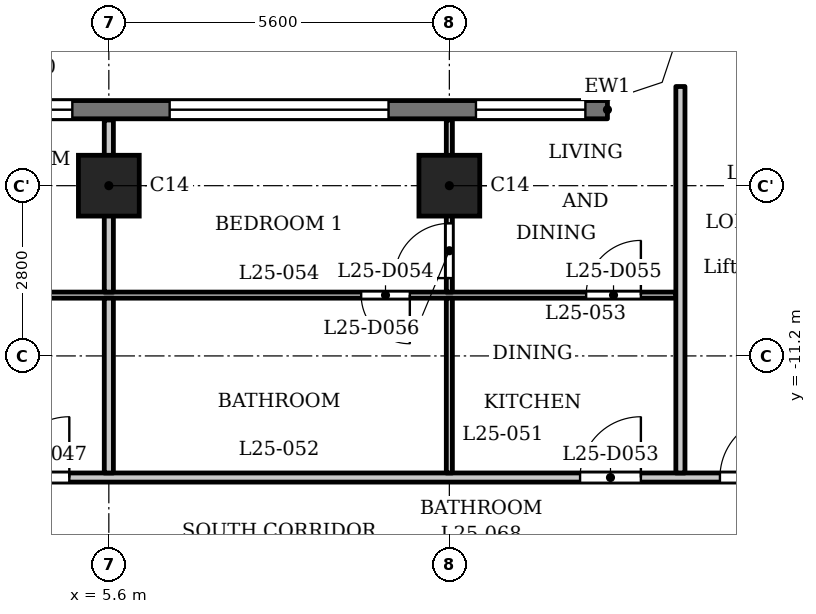
"""IFC4 building model, lengths in metres.
Left out: names, types, materials, properties, quantities, classifications, styles, units other than length and angle.
Written with IfcOpenShell. Run it as: python <this file> out.ifc"""

import sys

from ifc_helpers import new_model, si_unit, direction, frame, frame_2d, origin, origin_2d, place, context, subcontext, project, spatial, polyline, rectangle, outline, extrude, element, fill, save


model = new_model("IFC4")
c1 = context("Model", 3, precision=1e-05, world=origin(), true_north=direction((0.0, 1.0)))
c2 = subcontext(c1, "Body", "Model", "MODEL_VIEW")
j1 = project(units=[si_unit("LENGTHUNIT", "METRE"), si_unit("PLANEANGLEUNIT", "RADIAN")], contexts=[c1])
p1 = place(None, origin())
s1 = spatial("IfcSite", under=j1, at=p1, CompositionType="ELEMENT")
p2 = place(p1, origin())
s2 = spatial("IfcBuilding", under=s1, at=p2, CompositionType="ELEMENT")
p3 = place(p2, frame((0.0, 0.0, 100.8)))
s3 = spatial("IfcBuildingStorey", under=s2, at=p3, CompositionType="ELEMENT", Elevation=100.8)
for number, where, z_axis, x_axis in (
    (1, (5.6, -8.4, 0.0), (0.0, 0.0, 1.0), (1.0, 0.0, 0.0)),
    (2, (11.2, -8.4, 0.0), (0.0, 0.0, 1.0), (1.0, 0.0, 0.0)),
):
    element("IfcColumn", number, at=place(p3, frame(where, z_axis=z_axis, x_axis=x_axis)), inside=s3, PredefinedType="COLUMN", context=c2, shape_type="SweptSolid", body=[
        extrude(rectangle(XDim=1.0, YDim=1.0, at=origin_2d()), origin(), (0.0, 0.0, 1.0), 3.5),
    ])
p4 = place(p3, frame((13.8, -7.15, 0.0), z_axis=(0.0, 0.0, 1.0), x_axis=(-1.0, 0.0, 0.0)))
e3 = element("IfcWall", 3, at=p4, inside=s3, PredefinedType="SOLIDWALL", context=c2, shape_type="SweptSolid", body=[
    extrude(rectangle(XDim=27.6, YDim=0.3, at=frame_2d((13.8, 0.0))), origin(), (0.0, 0.0, 1.0), 3.2),
])
p5 = place(p4, frame((0.363, 0.0, 0.9)))
e4 = element("IfcOpeningElement", 4, at=p5, cuts=e3, PredefinedType="OPENING", context=c2, shape_type="SweptSolid", body=[
    extrude(rectangle(XDim=1.8, YDim=1.25, at=frame_2d((0.9, 0.625))), frame((0.0, 0.16, 0.0), z_axis=(0.0, -1.0, 0.0), x_axis=(1.0, 0.0, 0.0)), (0.0, 0.0, 1.0), 0.32),
])
p6 = place(p4, frame((3.6, 0.0, 1.2)))
e5 = element("IfcOpeningElement", 5, at=p6, cuts=e3, PredefinedType="OPENING", context=c2, shape_type="SweptSolid", body=[
    extrude(rectangle(XDim=3.6, YDim=0.95, at=frame_2d((1.8, 0.475))), frame((0.0, 0.16, 0.0), z_axis=(0.0, -1.0, 0.0), x_axis=(1.0, 0.0, 0.0)), (0.0, 0.0, 1.0), 0.32),
])
p7 = place(p4, frame((8.8, 0.0, 0.9)))
e6 = element("IfcOpeningElement", 6, at=p7, cuts=e3, PredefinedType="OPENING", context=c2, shape_type="SweptSolid", body=[
    extrude(rectangle(XDim=1.8, YDim=1.25, at=frame_2d((0.9, 0.625))), frame((0.0, 0.16, 0.0), z_axis=(0.0, -1.0, 0.0), x_axis=(1.0, 0.0, 0.0)), (0.0, 0.0, 1.0), 0.32),
])
p8 = place(p4, frame((11.6, 0.0, 0.9)))
e7 = element("IfcOpeningElement", 7, at=p8, cuts=e3, PredefinedType="OPENING", context=c2, shape_type="SweptSolid", body=[
    extrude(rectangle(XDim=1.8, YDim=1.25, at=frame_2d((0.9, 0.625))), frame((0.0, 0.16, 0.0), z_axis=(0.0, -1.0, 0.0), x_axis=(1.0, 0.0, 0.0)), (0.0, 0.0, 1.0), 0.32),
])
p9 = place(p4, frame((14.8, 0.0, 1.2)))
e8 = element("IfcOpeningElement", 8, at=p9, cuts=e3, PredefinedType="OPENING", context=c2, shape_type="SweptSolid", body=[
    extrude(rectangle(XDim=3.6, YDim=0.95, at=frame_2d((1.8, 0.475))), frame((0.0, 0.16, 0.0), z_axis=(0.0, -1.0, 0.0), x_axis=(1.0, 0.0, 0.0)), (0.0, 0.0, 1.0), 0.32),
])
p10 = place(p4, frame((20.4, 0.0, 1.2)))
e9 = element("IfcOpeningElement", 9, at=p10, cuts=e3, PredefinedType="OPENING", context=c2, shape_type="SweptSolid", body=[
    extrude(rectangle(XDim=3.6, YDim=0.95, at=frame_2d((1.8, 0.475))), frame((0.0, 0.16, 0.0), z_axis=(0.0, -1.0, 0.0), x_axis=(1.0, 0.0, 0.0)), (0.0, 0.0, 1.0), 0.32),
])
p11 = place(p4, frame((25.438, 0.0, 0.9)))
e10 = element("IfcOpeningElement", 10, at=p11, cuts=e3, PredefinedType="OPENING", context=c2, shape_type="SweptSolid", body=[
    extrude(rectangle(XDim=1.8, YDim=1.25, at=frame_2d((0.9, 0.625))), frame((0.0, 0.16, 0.0), z_axis=(0.0, -1.0, 0.0), x_axis=(1.0, 0.0, 0.0)), (0.0, 0.0, 1.0), 0.32),
])
p12 = place(p3, frame((-17.4, -13.2, 0.0), z_axis=(0.0, 0.0, 1.0), x_axis=(1.0, 0.0, 0.0)))
e11 = element("IfcWall", 11, at=p12, inside=s3, PredefinedType="PARTITIONING", context=c2, shape_type="SweptSolid", body=[
    extrude(rectangle(XDim=34.8, YDim=0.15, at=frame_2d((17.4, 0.0))), origin(), (0.0, 0.0, 1.0), 3.2),
])
p13 = place(p12, frame((0.65, 0.0, 0.0)))
e12 = element("IfcOpeningElement", 12, at=p13, cuts=e11, PredefinedType="OPENING", context=c2, shape_type="SweptSolid", body=[
    extrude(rectangle(XDim=1.0, YDim=2.1, at=frame_2d((0.5, 1.05))), frame((0.0, 0.085, 0.0), z_axis=(0.0, -1.0, 0.0), x_axis=(1.0, 0.0, 0.0)), (0.0, 0.0, 1.0), 0.17),
])
p14 = place(p12, frame((33.05, 0.0, 0.0)))
e13 = element("IfcOpeningElement", 13, at=p14, cuts=e11, PredefinedType="OPENING", context=c2, shape_type="SweptSolid", body=[
    extrude(rectangle(XDim=1.0, YDim=2.1, at=frame_2d((0.5, 1.05))), frame((0.0, 0.085, 0.0), z_axis=(0.0, -1.0, 0.0), x_axis=(1.0, 0.0, 0.0)), (0.0, 0.0, 1.0), 0.17),
])
p15 = place(p12, frame((4.55, 0.0, 0.0)))
e14 = element("IfcOpeningElement", 14, at=p15, cuts=e11, PredefinedType="OPENING", context=c2, shape_type="SweptSolid", body=[
    extrude(rectangle(XDim=1.0, YDim=2.1, at=frame_2d((0.5, 1.05))), frame((0.0, 0.085, 0.0), z_axis=(0.0, -1.0, 0.0), x_axis=(1.0, 0.0, 0.0)), (0.0, 0.0, 1.0), 0.17),
])
p16 = place(p12, frame((21.35, 0.0, 0.0)))
e15 = element("IfcOpeningElement", 15, at=p16, cuts=e11, PredefinedType="OPENING", context=c2, shape_type="SweptSolid", body=[
    extrude(rectangle(XDim=1.0, YDim=2.1, at=frame_2d((0.5, 1.05))), frame((0.0, 0.085, 0.0), z_axis=(0.0, -1.0, 0.0), x_axis=(1.0, 0.0, 0.0)), (0.0, 0.0, 1.0), 0.17),
])
p17 = place(p12, frame((30.75, 0.0, 0.0)))
e16 = element("IfcOpeningElement", 16, at=p17, cuts=e11, PredefinedType="OPENING", context=c2, shape_type="SweptSolid", body=[
    extrude(rectangle(XDim=1.0, YDim=2.1, at=frame_2d((0.5, 1.05))), frame((0.0, 0.085, 0.0), z_axis=(0.0, -1.0, 0.0), x_axis=(1.0, 0.0, 0.0)), (0.0, 0.0, 1.0), 0.17),
])
p18 = place(p3, frame((-14.925, -10.2, 0.0), z_axis=(0.0, 0.0, 1.0), x_axis=(1.0, 0.0, 0.0)))
e17 = element("IfcWall", 17, at=p18, inside=s3, PredefinedType="PARTITIONING", context=c2, shape_type="SweptSolid", body=[
    extrude(rectangle(XDim=29.85, YDim=0.1, at=frame_2d((14.925, 0.0))), origin(), (0.0, 0.0, 1.0), 3.2),
])
p19 = place(p18, frame((7.875, 0.0, 0.0)))
e18 = element("IfcOpeningElement", 18, at=p19, cuts=e17, PredefinedType="OPENING", context=c2, shape_type="SweptSolid", body=[
    extrude(rectangle(XDim=0.8, YDim=2.1, at=frame_2d((0.4, 1.05))), frame((0.0, 0.06, 0.0), z_axis=(0.0, -1.0, 0.0), x_axis=(1.0, 0.0, 0.0)), (0.0, 0.0, 1.0), 0.12),
])
p20 = place(p18, frame((2.175, 0.0, 0.0)))
e19 = element("IfcOpeningElement", 19, at=p20, cuts=e17, PredefinedType="OPENING", context=c2, shape_type="SweptSolid", body=[
    extrude(rectangle(XDim=0.9, YDim=2.1, at=frame_2d((0.45, 1.05))), frame((0.0, 0.06, 0.0), z_axis=(0.0, -1.0, 0.0), x_axis=(1.0, 0.0, 0.0)), (0.0, 0.0, 1.0), 0.12),
])
p21 = place(p18, frame((9.975, 0.0, 0.0)))
e20 = element("IfcOpeningElement", 20, at=p21, cuts=e17, PredefinedType="OPENING", context=c2, shape_type="SweptSolid", body=[
    extrude(rectangle(XDim=0.8, YDim=2.1, at=frame_2d((0.4, 1.05))), frame((0.0, 0.06, 0.0), z_axis=(0.0, -1.0, 0.0), x_axis=(1.0, 0.0, 0.0)), (0.0, 0.0, 1.0), 0.12),
])
p22 = place(p18, frame((12.125, 0.0, 0.0)))
e21 = element("IfcOpeningElement", 21, at=p22, cuts=e17, PredefinedType="OPENING", context=c2, shape_type="SweptSolid", body=[
    extrude(rectangle(XDim=0.9, YDim=2.1, at=frame_2d((0.45, 1.05))), frame((0.0, 0.06, 0.0), z_axis=(0.0, -1.0, 0.0), x_axis=(1.0, 0.0, 0.0)), (0.0, 0.0, 1.0), 0.12),
])
p23 = place(p18, frame((15.975, 0.0, 0.0)))
e22 = element("IfcOpeningElement", 22, at=p23, cuts=e17, PredefinedType="OPENING", context=c2, shape_type="SweptSolid", body=[
    extrude(rectangle(XDim=0.9, YDim=2.1, at=frame_2d((0.45, 1.05))), frame((0.0, 0.06, 0.0), z_axis=(0.0, -1.0, 0.0), x_axis=(1.0, 0.0, 0.0)), (0.0, 0.0, 1.0), 0.12),
])
p24 = place(p18, frame((18.225, 0.0, 0.0)))
e23 = element("IfcOpeningElement", 23, at=p24, cuts=e17, PredefinedType="OPENING", context=c2, shape_type="SweptSolid", body=[
    extrude(rectangle(XDim=0.9, YDim=2.1, at=frame_2d((0.45, 1.05))), frame((0.0, 0.06, 0.0), z_axis=(0.0, -1.0, 0.0), x_axis=(1.0, 0.0, 0.0)), (0.0, 0.0, 1.0), 0.12),
])
p25 = place(p18, frame((24.675, 0.0, 0.0)))
e24 = element("IfcOpeningElement", 24, at=p25, cuts=e17, PredefinedType="OPENING", context=c2, shape_type="SweptSolid", body=[
    extrude(rectangle(XDim=0.8, YDim=2.1, at=frame_2d((0.4, 1.05))), frame((0.0, 0.06, 0.0), z_axis=(0.0, -1.0, 0.0), x_axis=(1.0, 0.0, 0.0)), (0.0, 0.0, 1.0), 0.12),
])
p26 = place(p18, frame((28.375, 0.0, 0.0)))
e25 = element("IfcOpeningElement", 25, at=p26, cuts=e17, PredefinedType="OPENING", context=c2, shape_type="SweptSolid", body=[
    extrude(rectangle(XDim=0.9, YDim=2.1, at=frame_2d((0.45, 1.05))), frame((0.0, 0.06, 0.0), z_axis=(0.0, -1.0, 0.0), x_axis=(1.0, 0.0, 0.0)), (0.0, 0.0, 1.0), 0.12),
])
p27 = place(p3, frame((5.6, -13.125, 0.0), z_axis=(0.0, 0.0, 1.0), x_axis=(0.0, 1.0, 0.0)))
e26 = element("IfcWall", 26, at=p27, inside=s3, PredefinedType="PARTITIONING", context=c2, shape_type="SweptSolid", body=[
    extrude(rectangle(XDim=2.875, YDim=0.15, at=frame_2d((1.438, 0.0))), origin(), (0.0, 0.0, 1.0), 3.2),
])
p28 = place(p3, frame((5.6, -10.15, 0.0), z_axis=(0.0, 0.0, 1.0), x_axis=(0.0, 1.0, 0.0)))
e27 = element("IfcWall", 27, at=p28, inside=s3, PredefinedType="PARTITIONING", context=c2, shape_type="SweptSolid", body=[
    extrude(rectangle(XDim=2.83, YDim=0.15, at=frame_2d((1.415, 0.0))), origin(), (0.0, 0.0, 1.0), 3.2),
])
p29 = place(p3, frame((11.2, -13.125, 0.0), z_axis=(0.0, 0.0, 1.0), x_axis=(0.0, 1.0, 0.0)))
e28 = element("IfcWall", 28, at=p29, inside=s3, PredefinedType="PARTITIONING", context=c2, shape_type="SweptSolid", body=[
    extrude(rectangle(XDim=2.875, YDim=0.1, at=frame_2d((1.438, 0.0))), origin(), (0.0, 0.0, 1.0), 3.2),
])
p30 = place(p3, frame((11.2, -10.15, 0.0), z_axis=(0.0, 0.0, 1.0), x_axis=(0.0, 1.0, 0.0)))
e29 = element("IfcWall", 29, at=p30, inside=s3, PredefinedType="PARTITIONING", context=c2, shape_type="SweptSolid", body=[
    extrude(rectangle(XDim=2.83, YDim=0.1, at=frame_2d((1.415, 0.0))), origin(), (0.0, 0.0, 1.0), 3.2),
])
p31 = place(p30, frame((0.23, 0.0, 0.0)))
e30 = element("IfcOpeningElement", 30, at=p31, cuts=e29, PredefinedType="OPENING", context=c2, shape_type="SweptSolid", body=[
    extrude(rectangle(XDim=0.9, YDim=2.1, at=frame_2d((0.45, 1.05))), frame((0.0, 0.06, 0.0), z_axis=(0.0, -1.0, 0.0), x_axis=(1.0, 0.0, 0.0)), (0.0, 0.0, 1.0), 0.12),
])
p32 = place(p3, frame((15.0, -13.125, 0.0), z_axis=(0.0, 0.0, 1.0), x_axis=(0.0, 1.0, 0.0)))
e31 = element("IfcWall", 31, at=p32, inside=s3, PredefinedType="PARTITIONING", context=c2, shape_type="SweptSolid", body=[
    extrude(rectangle(XDim=6.356, YDim=0.15, at=frame_2d((3.178, 0.0))), origin(), (0.0, 0.0, 1.0), 3.2),
])
p33 = place(p3, origin())
e32 = element("IfcWall", 32, at=p33, inside=s3, PredefinedType="SOLIDWALL", context=c2, shape_type="SweptSolid", body=[
    extrude(outline(polyline([(14.937, -6.937), (15.3, -5.849), (15.3, -5.8), (15.0, -5.8), (14.7, -6.7), (13.8, -7.0), (13.8, -7.3), (13.849, -7.3), (14.937, -6.937)])), origin(), (0.0, 0.0, 1.0), 3.2),
])
p34 = place(p14, origin())
e33 = element("IfcDoor", 33, at=p34, inside=s3, OperationType="SINGLE_SWING_LEFT", PredefinedType="DOOR", context=c2, shape_type="SweptSolid", body=[
    extrude(rectangle(XDim=1.0, YDim=2.1, at=frame_2d((0.5, 1.05))), frame((0.0, 0.025, 0.0), z_axis=(0.0, -1.0, 0.0), x_axis=(1.0, 0.0, 0.0)), (0.0, 0.0, 1.0), 0.05),
])
fill(e13, e33)
p35 = place(p16, origin())
e34 = element("IfcDoor", 34, at=p35, inside=s3, OperationType="SINGLE_SWING_LEFT", PredefinedType="DOOR", context=c2, shape_type="SweptSolid", body=[
    extrude(rectangle(XDim=1.0, YDim=2.1, at=frame_2d((0.5, 1.05))), frame((0.0, 0.025, 0.0), z_axis=(0.0, -1.0, 0.0), x_axis=(1.0, 0.0, 0.0)), (0.0, 0.0, 1.0), 0.05),
])
fill(e15, e34)
p36 = place(p17, origin())
e35 = element("IfcDoor", 35, at=p36, inside=s3, OperationType="SINGLE_SWING_LEFT", PredefinedType="DOOR", context=c2, shape_type="SweptSolid", body=[
    extrude(rectangle(XDim=1.0, YDim=2.1, at=frame_2d((0.5, 1.05))), frame((0.0, 0.025, 0.0), z_axis=(0.0, -1.0, 0.0), x_axis=(1.0, 0.0, 0.0)), (0.0, 0.0, 1.0), 0.05),
])
fill(e16, e35)
p37 = place(p25, origin())
e36 = element("IfcDoor", 36, at=p37, inside=s3, OperationType="SINGLE_SWING_RIGHT", PredefinedType="DOOR", context=c2, shape_type="SweptSolid", body=[
    extrude(rectangle(XDim=0.8, YDim=2.1, at=frame_2d((0.4, 1.05))), frame((0.0, 0.025, 0.0), z_axis=(0.0, -1.0, 0.0), x_axis=(1.0, 0.0, 0.0)), (0.0, 0.0, 1.0), 0.05),
])
fill(e24, e36)
p38 = place(p26, origin())
e37 = element("IfcDoor", 37, at=p38, inside=s3, OperationType="SINGLE_SWING_LEFT", PredefinedType="DOOR", context=c2, shape_type="SweptSolid", body=[
    extrude(rectangle(XDim=0.9, YDim=2.1, at=frame_2d((0.45, 1.05))), frame((0.0, 0.025, 0.0), z_axis=(0.0, -1.0, 0.0), x_axis=(1.0, 0.0, 0.0)), (0.0, 0.0, 1.0), 0.05),
])
fill(e25, e37)
p39 = place(p31, origin())
e38 = element("IfcDoor", 38, at=p39, inside=s3, OperationType="SINGLE_SWING_RIGHT", PredefinedType="DOOR", context=c2, shape_type="SweptSolid", body=[
    extrude(rectangle(XDim=0.9, YDim=2.1, at=frame_2d((0.45, 1.05))), frame((0.0, 0.025, 0.0), z_axis=(0.0, -1.0, 0.0), x_axis=(1.0, 0.0, 0.0)), (0.0, 0.0, 1.0), 0.05),
])
fill(e30, e38)
p40 = place(p5, origin())
e39 = element("IfcWindow", 39, at=p40, inside=s3, PartitioningType="SINGLE_PANEL", PredefinedType="WINDOW", context=c2, shape_type="SweptSolid", body=[
    extrude(rectangle(XDim=1.8, YDim=1.25, at=frame_2d((0.9, 0.625))), frame((0.0, 0.03, 0.0), z_axis=(0.0, -1.0, 0.0), x_axis=(1.0, 0.0, 0.0)), (0.0, 0.0, 1.0), 0.06),
])
fill(e4, e39)
p41 = place(p6, origin())
e40 = element("IfcWindow", 40, at=p41, inside=s3, PartitioningType="SINGLE_PANEL", PredefinedType="WINDOW", context=c2, shape_type="SweptSolid", body=[
    extrude(rectangle(XDim=3.6, YDim=0.95, at=frame_2d((1.8, 0.475))), frame((0.0, 0.03, 0.0), z_axis=(0.0, -1.0, 0.0), x_axis=(1.0, 0.0, 0.0)), (0.0, 0.0, 1.0), 0.06),
])
fill(e5, e40)
p42 = place(p7, origin())
e41 = element("IfcWindow", 41, at=p42, inside=s3, PartitioningType="SINGLE_PANEL", PredefinedType="WINDOW", context=c2, shape_type="SweptSolid", body=[
    extrude(rectangle(XDim=1.8, YDim=1.25, at=frame_2d((0.9, 0.625))), frame((0.0, 0.03, 0.0), z_axis=(0.0, -1.0, 0.0), x_axis=(1.0, 0.0, 0.0)), (0.0, 0.0, 1.0), 0.06),
])
fill(e6, e41)
save(model, sys.argv[1])
